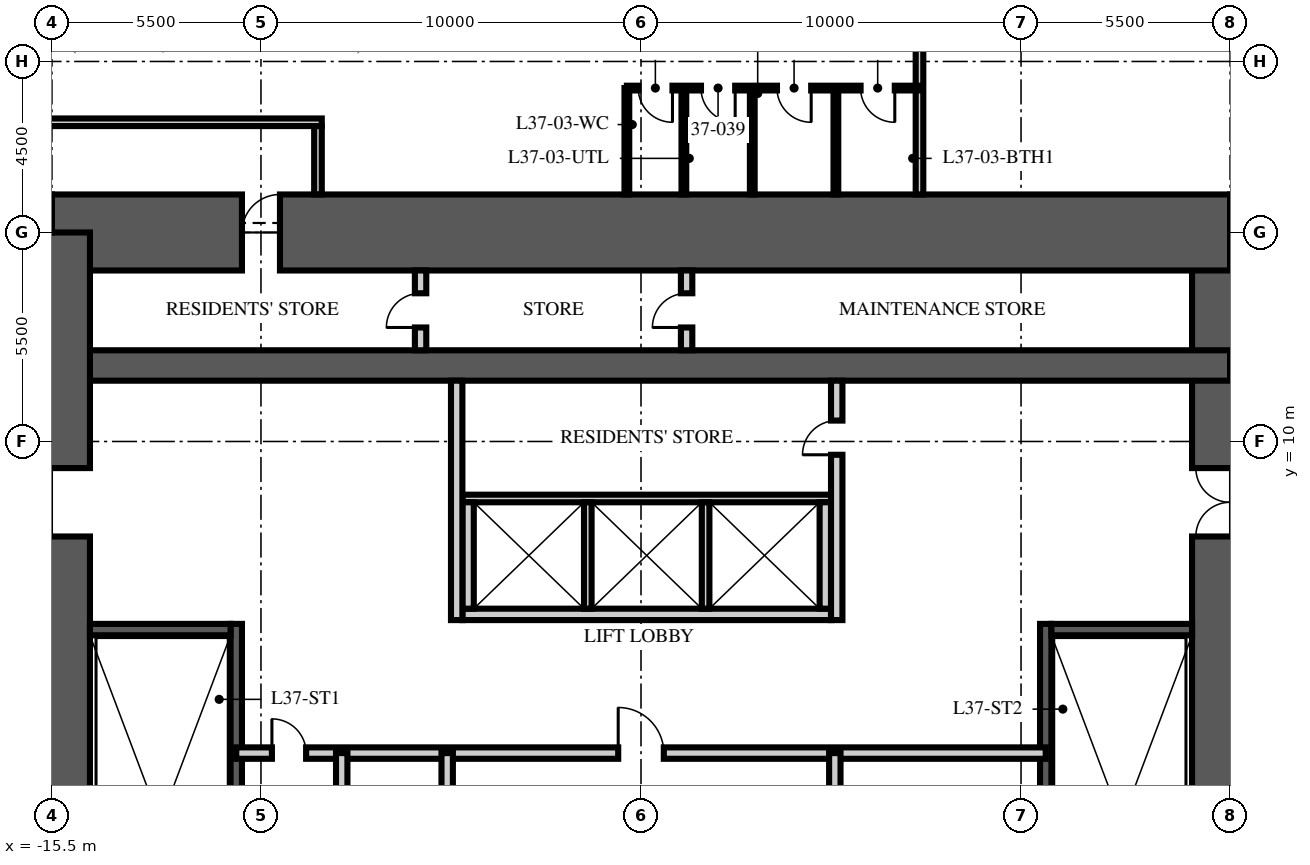
"""IFC4 building model, lengths in metres.
Left out: names, types, materials, properties, quantities, classifications, styles, units other than length and angle.
Written with IfcOpenShell. Run it as: python <this file> out.ifc"""

import sys

from ifc_helpers import new_model, si_unit, direction, frame, frame_2d, origin, place, context, subcontext, project, spatial, rectangle, extrude, element, fill, save


model = new_model("IFC4")
c1 = context("Model", 3, precision=1e-05, world=origin(), true_north=direction((0.0, 1.0)))
c2 = subcontext(c1, "Body", "Model", "MODEL_VIEW")
j1 = project(units=[si_unit("LENGTHUNIT", "METRE"), si_unit("PLANEANGLEUNIT", "RADIAN")], contexts=[c1])
p1 = place(None, origin())
s1 = spatial("IfcSite", under=j1, at=p1, CompositionType="ELEMENT")
p2 = place(p1, origin())
s2 = spatial("IfcBuilding", under=s1, at=p2, CompositionType="ELEMENT")
p3 = place(p2, frame((0.0, 0.0, 148.5)))
s3 = spatial("IfcBuildingStorey", under=s2, at=p3, CompositionType="ELEMENT", Elevation=148.5)
p4 = place(p3, frame((15.5, -15.5, -0.25), z_axis=(0.0, 0.0, 1.0), x_axis=(0.0, 1.0, 0.0)))
e1 = element("IfcWall", 1, at=p4, inside=s3, PredefinedType="SHEAR", context=c2, shape_type="SweptSolid", body=[
    extrude(rectangle(XDim=31.0, YDim=2.0, at=frame_2d((15.5, 0.0))), origin(), (0.0, 0.0, 1.0), 3.75),
])
p5 = place(p4, frame((6.5, 0.0, 0.25)))
e2 = element("IfcOpeningElement", 2, at=p5, cuts=e1, PredefinedType="OPENING", context=c2, shape_type="SweptSolid", body=[
    extrude(rectangle(XDim=1.2, YDim=2.1, at=frame_2d((0.6, 1.05))), frame((0.0, 1.01, 0.0), z_axis=(0.0, -1.0, 0.0), x_axis=(1.0, 0.0, 0.0)), (0.0, 0.0, 1.0), 2.02),
])
p6 = place(p4, frame((23.0, 0.0, 0.25)))
e3 = element("IfcOpeningElement", 3, at=p6, cuts=e1, PredefinedType="OPENING", context=c2, shape_type="SweptSolid", body=[
    extrude(rectangle(XDim=1.8, YDim=2.1, at=frame_2d((0.9, 1.05))), frame((0.0, 1.01, 0.0), z_axis=(0.0, -1.0, 0.0), x_axis=(1.0, 0.0, 0.0)), (0.0, 0.0, 1.0), 2.02),
])
p7 = place(p3, frame((-15.5, 15.5, -0.25), z_axis=(0.0, 0.0, 1.0), x_axis=(1.0, 0.0, 0.0)))
e4 = element("IfcWall", 4, at=p7, inside=s3, PredefinedType="SHEAR", context=c2, shape_type="SweptSolid", body=[
    extrude(rectangle(XDim=31.0, YDim=2.0, at=frame_2d((15.5, 0.0))), origin(), (0.0, 0.0, 1.0), 3.75),
])
p8 = place(p7, frame((5.0, 0.0, 0.25)))
e5 = element("IfcOpeningElement", 5, at=p8, cuts=e4, PredefinedType="OPENING", context=c2, shape_type="SweptSolid", body=[
    extrude(rectangle(XDim=1.0, YDim=2.1, at=frame_2d((0.5, 1.05))), frame((0.0, 1.01, 0.0), z_axis=(0.0, -1.0, 0.0), x_axis=(1.0, 0.0, 0.0)), (0.0, 0.0, 1.0), 2.02),
])
p9 = place(p3, frame((-15.5, 12.0, -0.25), z_axis=(0.0, 0.0, 1.0), x_axis=(1.0, 0.0, 0.0)))
e6 = element("IfcWall", 6, at=p9, inside=s3, PredefinedType="SHEAR", context=c2, shape_type="SweptSolid", body=[
    extrude(rectangle(XDim=31.0, YDim=0.8, at=frame_2d((15.5, 0.0))), origin(), (0.0, 0.0, 1.0), 3.75),
])
p10 = place(p3, frame((-15.5, -15.5, -0.25), z_axis=(0.0, 0.0, 1.0), x_axis=(0.0, 1.0, 0.0)))
e7 = element("IfcWall", 7, at=p10, inside=s3, PredefinedType="SHEAR", context=c2, shape_type="SweptSolid", body=[
    extrude(rectangle(XDim=31.0, YDim=2.0, at=frame_2d((15.5, 0.0))), origin(), (0.0, 0.0, 1.0), 3.75),
])
p11 = place(p10, frame((6.5, 0.0, 0.25)))
e8 = element("IfcOpeningElement", 8, at=p11, cuts=e7, PredefinedType="OPENING", context=c2, shape_type="SweptSolid", body=[
    extrude(rectangle(XDim=1.2, YDim=2.1, at=frame_2d((0.6, 1.05))), frame((0.0, 1.01, 0.0), z_axis=(0.0, -1.0, 0.0), x_axis=(1.0, 0.0, 0.0)), (0.0, 0.0, 1.0), 2.02),
])
p12 = place(p10, frame((23.0, 0.0, 0.25)))
e9 = element("IfcOpeningElement", 9, at=p12, cuts=e7, PredefinedType="OPENING", context=c2, shape_type="SweptSolid", body=[
    extrude(rectangle(XDim=1.8, YDim=2.1, at=frame_2d((0.9, 1.05))), frame((0.0, 1.01, 0.0), z_axis=(0.0, -1.0, 0.0), x_axis=(1.0, 0.0, 0.0)), (0.0, 0.0, 1.0), 2.02),
])
p13 = place(p3, frame((-10.65, -4.9, 0.0), z_axis=(0.0, 0.0, 1.0), x_axis=(0.0, 1.0, 0.0)))
e10 = element("IfcWall", 10, at=p13, inside=s3, PredefinedType="SOLIDWALL", context=c2, shape_type="SweptSolid", body=[
    extrude(rectangle(XDim=10.1, YDim=0.3, at=frame_2d((5.05, 0.0))), origin(), (0.0, 0.0, 1.0), 3.5),
])
p14 = place(p3, frame((-14.5, 5.05, 0.0), z_axis=(0.0, 0.0, 1.0), x_axis=(1.0, 0.0, 0.0)))
e11 = element("IfcWall", 11, at=p14, inside=s3, PredefinedType="SOLIDWALL", context=c2, shape_type="SweptSolid", body=[
    extrude(rectangle(XDim=3.7, YDim=0.3, at=frame_2d((1.85, 0.0))), origin(), (0.0, 0.0, 1.0), 3.5),
])
p15 = place(p3, frame((10.65, -4.9, 0.0), z_axis=(0.0, 0.0, 1.0), x_axis=(0.0, 1.0, 0.0)))
e12 = element("IfcWall", 12, at=p15, inside=s3, PredefinedType="SOLIDWALL", context=c2, shape_type="SweptSolid", body=[
    extrude(rectangle(XDim=10.1, YDim=0.3, at=frame_2d((5.05, 0.0))), origin(), (0.0, 0.0, 1.0), 3.5),
])
p16 = place(p3, frame((14.5, 5.05, 0.0), z_axis=(0.0, 0.0, 1.0), x_axis=(-1.0, 0.0, 0.0)))
e13 = element("IfcWall", 13, at=p16, inside=s3, PredefinedType="SOLIDWALL", context=c2, shape_type="SweptSolid", body=[
    extrude(rectangle(XDim=3.7, YDim=0.3, at=frame_2d((1.85, 0.0))), origin(), (0.0, 0.0, 1.0), 3.5),
])
p17 = place(p3, frame((-4.7, 5.45, 0.0), z_axis=(0.0, 0.0, 1.0), x_axis=(1.0, 0.0, 0.0)))
e14 = element("IfcWall", 14, at=p17, inside=s3, PredefinedType="PARTITIONING", context=c2, shape_type="SweptSolid", body=[
    extrude(rectangle(XDim=9.7, YDim=0.3, at=frame_2d((4.85, 0.0))), origin(), (0.0, 0.0, 1.0), 3.5),
])
p18 = place(p3, frame((-4.7, 8.5, 0.0), z_axis=(0.0, 0.0, 1.0), x_axis=(1.0, 0.0, 0.0)))
e15 = element("IfcWall", 15, at=p18, inside=s3, PredefinedType="PARTITIONING", context=c2, shape_type="SweptSolid", body=[
    extrude(rectangle(XDim=9.7, YDim=0.2, at=frame_2d((4.85, 0.0))), origin(), (0.0, 0.0, 1.0), 3.5),
])
for number, where, z_axis, x_axis in (
    (16, (-4.55, 5.6, 0.0), (0.0, 0.0, 1.0), (0.0, 1.0, 0.0)),
    (17, (4.85, 5.6, 0.0), (0.0, 0.0, 1.0), (0.0, 1.0, 0.0)),
):
    element("IfcWall", number, at=place(p3, frame(where, z_axis=z_axis, x_axis=x_axis)), inside=s3, PredefinedType="PARTITIONING", context=c2, shape_type="SweptSolid", body=[
        extrude(rectangle(XDim=2.8, YDim=0.3, at=frame_2d((1.4, 0.0))), origin(), (0.0, 0.0, 1.0), 3.5),
    ])
for number, where, z_axis, x_axis in (
    (18, (-1.4, 5.6, 0.0), (0.0, 0.0, 1.0), (0.0, 1.0, 0.0)),
    (19, (1.7, 5.6, 0.0), (0.0, 0.0, 1.0), (0.0, 1.0, 0.0)),
):
    element("IfcWall", number, at=place(p3, frame(where, z_axis=z_axis, x_axis=x_axis)), inside=s3, PredefinedType="PARTITIONING", context=c2, shape_type="SweptSolid", body=[
        extrude(rectangle(XDim=2.8, YDim=0.2, at=frame_2d((1.4, 0.0))), origin(), (0.0, 0.0, 1.0), 3.5),
    ])
p19 = place(p3, frame((-10.65, 1.8, 0.0), z_axis=(0.0, 0.0, 1.0), x_axis=(1.0, 0.0, 0.0)))
e20 = element("IfcWall", 20, at=p19, inside=s3, PredefinedType="PARTITIONING", context=c2, shape_type="SweptSolid", body=[
    extrude(rectangle(XDim=21.3, YDim=0.3, at=frame_2d((10.65, 0.0))), origin(), (0.0, 0.0, 1.0), 3.5),
])
p20 = place(p19, frame((10.05, 0.0, 0.0)))
e21 = element("IfcOpeningElement", 21, at=p20, cuts=e20, PredefinedType="OPENING", context=c2, shape_type="SweptSolid", body=[
    extrude(rectangle(XDim=1.2, YDim=2.1, at=frame_2d((0.6, 1.05))), frame((0.0, 0.16, 0.0), z_axis=(0.0, -1.0, 0.0), x_axis=(1.0, 0.0, 0.0)), (0.0, 0.0, 1.0), 0.32),
])
p21 = place(p19, frame((0.938, 0.0, 0.0)))
e22 = element("IfcOpeningElement", 22, at=p21, cuts=e20, PredefinedType="OPENING", context=c2, shape_type="SweptSolid", body=[
    extrude(rectangle(XDim=0.9, YDim=2.1, at=frame_2d((0.45, 1.05))), frame((0.0, 0.16, 0.0), z_axis=(0.0, -1.0, 0.0), x_axis=(1.0, 0.0, 0.0)), (0.0, 0.0, 1.0), 0.32),
])
p22 = place(p3, frame((-5.1, -6.65, 0.0), z_axis=(0.0, 0.0, 1.0), x_axis=(0.0, 1.0, 0.0)))
e23 = element("IfcWall", 23, at=p22, inside=s3, PredefinedType="PARTITIONING", context=c2, shape_type="SweptSolid", body=[
    extrude(rectangle(XDim=8.45, YDim=0.3, at=frame_2d((4.225, 0.0))), origin(), (0.0, 0.0, 1.0), 3.5),
])
p23 = place(p22, frame((1.7, 0.0, 0.0)))
e24 = element("IfcOpeningElement", 24, at=p23, cuts=e23, PredefinedType="OPENING", context=c2, shape_type="SweptSolid", body=[
    extrude(rectangle(XDim=0.9, YDim=2.1, at=frame_2d((0.45, 1.05))), frame((0.0, 0.16, 0.0), z_axis=(0.0, -1.0, 0.0), x_axis=(1.0, 0.0, 0.0)), (0.0, 0.0, 1.0), 0.32),
])
p24 = place(p22, frame((5.925, 0.0, 0.0)))
e25 = element("IfcOpeningElement", 25, at=p24, cuts=e23, PredefinedType="OPENING", context=c2, shape_type="SweptSolid", body=[
    extrude(rectangle(XDim=0.9, YDim=2.1, at=frame_2d((0.45, 1.05))), frame((0.0, 0.16, 0.0), z_axis=(0.0, -1.0, 0.0), x_axis=(1.0, 0.0, 0.0)), (0.0, 0.0, 1.0), 0.32),
])
p25 = place(p3, frame((5.1, -6.65, 0.0), z_axis=(0.0, 0.0, 1.0), x_axis=(0.0, 1.0, 0.0)))
e26 = element("IfcWall", 26, at=p25, inside=s3, PredefinedType="PARTITIONING", context=c2, shape_type="SweptSolid", body=[
    extrude(rectangle(XDim=8.45, YDim=0.3, at=frame_2d((4.225, 0.0))), origin(), (0.0, 0.0, 1.0), 3.5),
])
p26 = place(p25, frame((1.866, 0.0, 0.0)))
e27 = element("IfcOpeningElement", 27, at=p26, cuts=e26, PredefinedType="OPENING", context=c2, shape_type="SweptSolid", body=[
    extrude(rectangle(XDim=0.9, YDim=2.1, at=frame_2d((0.45, 1.05))), frame((0.0, 0.16, 0.0), z_axis=(0.0, -1.0, 0.0), x_axis=(1.0, 0.0, 0.0)), (0.0, 0.0, 1.0), 0.32),
])
p27 = place(p25, frame((6.091, 0.0, 0.0)))
e28 = element("IfcOpeningElement", 28, at=p27, cuts=e26, PredefinedType="OPENING", context=c2, shape_type="SweptSolid", body=[
    extrude(rectangle(XDim=0.9, YDim=2.1, at=frame_2d((0.45, 1.05))), frame((0.0, 0.16, 0.0), z_axis=(0.0, -1.0, 0.0), x_axis=(1.0, 0.0, 0.0)), (0.0, 0.0, 1.0), 0.32),
])
p28 = place(p3, frame((-7.875, -2.35, 0.0), z_axis=(0.0, 0.0, 1.0), x_axis=(0.0, 1.0, 0.0)))
e29 = element("IfcWall", 29, at=p28, inside=s3, PredefinedType="PARTITIONING", context=c2, shape_type="SweptSolid", body=[
    extrude(rectangle(XDim=4.15, YDim=0.3, at=frame_2d((2.075, 0.0))), origin(), (0.0, 0.0, 1.0), 3.5),
])
p29 = place(p3, frame((-4.85, 5.3, 0.0), z_axis=(0.0, 0.0, 1.0), x_axis=(0.0, 1.0, 0.0)))
e30 = element("IfcWall", 30, at=p29, inside=s3, PredefinedType="PARTITIONING", context=c2, shape_type="SweptSolid", body=[
    extrude(rectangle(XDim=6.3, YDim=0.3, at=frame_2d((3.15, 0.0))), origin(), (0.0, 0.0, 1.0), 3.5),
])
p30 = place(p3, frame((5.15, 5.3, 0.0), z_axis=(0.0, 0.0, 1.0), x_axis=(0.0, 1.0, 0.0)))
e31 = element("IfcWall", 31, at=p30, inside=s3, PredefinedType="PARTITIONING", context=c2, shape_type="SweptSolid", body=[
    extrude(rectangle(XDim=6.3, YDim=0.3, at=frame_2d((3.15, 0.0))), origin(), (0.0, 0.0, 1.0), 3.5),
])
p31 = place(p30, frame((4.35, 0.0, 0.0)))
e32 = element("IfcOpeningElement", 32, at=p31, cuts=e31, PredefinedType="OPENING", context=c2, shape_type="SweptSolid", body=[
    extrude(rectangle(XDim=0.9, YDim=2.1, at=frame_2d((0.45, 1.05))), frame((0.0, 0.16, 0.0), z_axis=(0.0, -1.0, 0.0), x_axis=(1.0, 0.0, 0.0)), (0.0, 0.0, 1.0), 0.32),
])
p32 = place(p3, frame((-5.8, 12.4, 0.0), z_axis=(0.0, 0.0, 1.0), x_axis=(0.0, 1.0, 0.0)))
e33 = element("IfcWall", 33, at=p32, inside=s3, PredefinedType="PARTITIONING", context=c2, shape_type="SweptSolid", body=[
    extrude(rectangle(XDim=2.1, YDim=0.3, at=frame_2d((1.05, 0.0))), origin(), (0.0, 0.0, 1.0), 3.5),
])
p33 = place(p32, frame((0.6, 0.0, 0.0)))
e34 = element("IfcOpeningElement", 34, at=p33, cuts=e33, PredefinedType="OPENING", context=c2, shape_type="SweptSolid", body=[
    extrude(rectangle(XDim=0.9, YDim=2.1, at=frame_2d((0.45, 1.05))), frame((0.0, 0.16, 0.0), z_axis=(0.0, -1.0, 0.0), x_axis=(1.0, 0.0, 0.0)), (0.0, 0.0, 1.0), 0.32),
])
p34 = place(p3, frame((1.2, 12.4, 0.0), z_axis=(0.0, 0.0, 1.0), x_axis=(0.0, 1.0, 0.0)))
e35 = element("IfcWall", 35, at=p34, inside=s3, PredefinedType="PARTITIONING", context=c2, shape_type="SweptSolid", body=[
    extrude(rectangle(XDim=2.1, YDim=0.3, at=frame_2d((1.05, 0.0))), origin(), (0.0, 0.0, 1.0), 3.5),
])
p35 = place(p34, frame((0.6, 0.0, 0.0)))
e36 = element("IfcOpeningElement", 36, at=p35, cuts=e35, PredefinedType="OPENING", context=c2, shape_type="SweptSolid", body=[
    extrude(rectangle(XDim=0.9, YDim=2.1, at=frame_2d((0.45, 1.05))), frame((0.0, 0.16, 0.0), z_axis=(0.0, -1.0, 0.0), x_axis=(1.0, 0.0, 0.0)), (0.0, 0.0, 1.0), 0.32),
])
p36 = place(p3, frame((-18.5, 18.4, 0.0), z_axis=(0.0, 0.0, 1.0), x_axis=(1.0, 0.0, 0.0)))
e37 = element("IfcWall", 37, at=p36, inside=s3, PredefinedType="PARTITIONING", context=c2, shape_type="SweptSolid", body=[
    extrude(rectangle(XDim=10.1, YDim=0.2, at=frame_2d((5.05, 0.0))), origin(), (0.0, 0.0, 1.0), 2.3),
])
p37 = place(p3, frame((-8.5, 18.3, 0.0), z_axis=(0.0, 0.0, 1.0), x_axis=(0.0, -1.0, 0.0)))
e38 = element("IfcWall", 38, at=p37, inside=s3, PredefinedType="PARTITIONING", context=c2, shape_type="SweptSolid", body=[
    extrude(rectangle(XDim=1.8, YDim=0.2, at=frame_2d((0.9, 0.0))), origin(), (0.0, 0.0, 1.0), 3.5),
])
p38 = place(p3, frame((7.328, 16.5, 0.0), z_axis=(0.0, 0.0, 1.0), x_axis=(0.0, 1.0, 0.0)))
e39 = element("IfcWall", 39, at=p38, inside=s3, PredefinedType="PARTITIONING", context=c2, shape_type="SweptSolid", body=[
    extrude(rectangle(XDim=12.15, YDim=0.2, at=frame_2d((6.075, 0.0))), origin(), (0.0, 0.0, 1.0), 2.81),
])
p39 = place(p3, frame((7.328, 19.3, 0.0), z_axis=(0.0, 0.0, 1.0), x_axis=(-1.0, 0.0, 0.0)))
e40 = element("IfcWall", 40, at=p39, inside=s3, PredefinedType="PARTITIONING", context=c2, shape_type="SweptSolid", body=[
    extrude(rectangle(XDim=7.7, YDim=0.125, at=frame_2d((3.85, 0.0))), origin(), (0.0, 0.0, 1.0), 2.7),
])
p40 = place(p39, frame((0.65, 0.0, 0.0)))
e41 = element("IfcOpeningElement", 41, at=p40, cuts=e40, PredefinedType="OPENING", context=c2, shape_type="SweptSolid", body=[
    extrude(rectangle(XDim=0.9, YDim=2.1, at=frame_2d((0.45, 1.05))), frame((0.0, 0.073, 0.0), z_axis=(0.0, -1.0, 0.0), x_axis=(1.0, 0.0, 0.0)), (0.0, 0.0, 1.0), 0.145),
])
p41 = place(p39, frame((2.85, 0.0, 0.0)))
e42 = element("IfcOpeningElement", 42, at=p41, cuts=e40, PredefinedType="OPENING", context=c2, shape_type="SweptSolid", body=[
    extrude(rectangle(XDim=0.9, YDim=2.1, at=frame_2d((0.45, 1.05))), frame((0.0, 0.073, 0.0), z_axis=(0.0, -1.0, 0.0), x_axis=(1.0, 0.0, 0.0)), (0.0, 0.0, 1.0), 0.145),
])
p42 = place(p39, frame((4.85, 0.0, 0.0)))
e43 = element("IfcOpeningElement", 43, at=p42, cuts=e40, PredefinedType="OPENING", context=c2, shape_type="SweptSolid", body=[
    extrude(rectangle(XDim=0.9, YDim=2.1, at=frame_2d((0.45, 1.05))), frame((0.0, 0.073, 0.0), z_axis=(0.0, -1.0, 0.0), x_axis=(1.0, 0.0, 0.0)), (0.0, 0.0, 1.0), 0.145),
])
p43 = place(p39, frame((6.5, 0.0, 0.0)))
e44 = element("IfcOpeningElement", 44, at=p43, cuts=e40, PredefinedType="OPENING", context=c2, shape_type="SweptSolid", body=[
    extrude(rectangle(XDim=0.9, YDim=2.1, at=frame_2d((0.45, 1.05))), frame((0.0, 0.073, 0.0), z_axis=(0.0, -1.0, 0.0), x_axis=(1.0, 0.0, 0.0)), (0.0, 0.0, 1.0), 0.145),
])
for number, where, z_axis, x_axis in (
    (45, (5.128, 16.5, 0.0), (0.0, 0.0, 1.0), (0.0, 1.0, 0.0)),
    (46, (2.928, 16.5, 0.0), (0.0, 0.0, 1.0), (0.0, 1.0, 0.0)),
    (47, (1.128, 16.5, 0.0), (0.0, 0.0, 1.0), (0.0, 1.0, 0.0)),
    (48, (-0.372, 16.5, 0.0), (0.0, 0.0, 1.0), (0.0, 1.0, 0.0)),
):
    element("IfcWall", number, at=place(p3, frame(where, z_axis=z_axis, x_axis=x_axis)), inside=s3, PredefinedType="PARTITIONING", context=c2, shape_type="SweptSolid", body=[
        extrude(rectangle(XDim=2.8, YDim=0.125, at=frame_2d((1.4, 0.0))), origin(), (0.0, 0.0, 1.0), 3.5),
    ])
p44 = place(p12, origin())
e49 = element("IfcDoor", 49, at=p44, inside=s3, OperationType="DOUBLE_DOOR_SINGLE_SWING", PredefinedType="DOOR", context=c2, shape_type="SweptSolid", body=[
    extrude(rectangle(XDim=1.8, YDim=2.1, at=frame_2d((0.9, 1.05))), frame((0.0, 0.025, 0.0), z_axis=(0.0, -1.0, 0.0), x_axis=(1.0, 0.0, 0.0)), (0.0, 0.0, 1.0), 0.05),
])
fill(e9, e49)
p45 = place(p6, origin())
e50 = element("IfcDoor", 50, at=p45, inside=s3, OperationType="DOUBLE_DOOR_SINGLE_SWING", PredefinedType="DOOR", context=c2, shape_type="SweptSolid", body=[
    extrude(rectangle(XDim=1.8, YDim=2.1, at=frame_2d((0.9, 1.05))), frame((0.0, 0.025, 0.0), z_axis=(0.0, -1.0, 0.0), x_axis=(1.0, 0.0, 0.0)), (0.0, 0.0, 1.0), 0.05),
])
fill(e3, e50)
p46 = place(p20, origin())
e51 = element("IfcDoor", 51, at=p46, inside=s3, OperationType="SINGLE_SWING_LEFT", PredefinedType="DOOR", context=c2, shape_type="SweptSolid", body=[
    extrude(rectangle(XDim=1.2, YDim=2.1, at=frame_2d((0.6, 1.05))), frame((0.0, 0.025, 0.0), z_axis=(0.0, -1.0, 0.0), x_axis=(1.0, 0.0, 0.0)), (0.0, 0.0, 1.0), 0.05),
])
fill(e21, e51)
p47 = place(p21, origin())
e52 = element("IfcDoor", 52, at=p47, inside=s3, OperationType="SINGLE_SWING_LEFT", PredefinedType="DOOR", context=c2, shape_type="SweptSolid", body=[
    extrude(rectangle(XDim=0.9, YDim=2.1, at=frame_2d((0.45, 1.05))), frame((0.0, 0.025, 0.0), z_axis=(0.0, -1.0, 0.0), x_axis=(1.0, 0.0, 0.0)), (0.0, 0.0, 1.0), 0.05),
])
fill(e22, e52)
p48 = place(p31, origin())
e53 = element("IfcDoor", 53, at=p48, inside=s3, OperationType="SINGLE_SWING_LEFT", PredefinedType="DOOR", context=c2, shape_type="SweptSolid", body=[
    extrude(rectangle(XDim=0.9, YDim=2.1, at=frame_2d((0.45, 1.05))), frame((0.0, 0.025, 0.0), z_axis=(0.0, -1.0, 0.0), x_axis=(1.0, 0.0, 0.0)), (0.0, 0.0, 1.0), 0.05),
])
fill(e32, e53)
p49 = place(p33, origin())
e54 = element("IfcDoor", 54, at=p49, inside=s3, OperationType="SINGLE_SWING_LEFT", PredefinedType="DOOR", context=c2, shape_type="SweptSolid", body=[
    extrude(rectangle(XDim=0.9, YDim=2.1, at=frame_2d((0.45, 1.05))), frame((0.0, 0.025, 0.0), z_axis=(0.0, -1.0, 0.0), x_axis=(1.0, 0.0, 0.0)), (0.0, 0.0, 1.0), 0.05),
])
fill(e34, e54)
p50 = place(p35, origin())
e55 = element("IfcDoor", 55, at=p50, inside=s3, OperationType="SINGLE_SWING_LEFT", PredefinedType="DOOR", context=c2, shape_type="SweptSolid", body=[
    extrude(rectangle(XDim=0.9, YDim=2.1, at=frame_2d((0.45, 1.05))), frame((0.0, 0.025, 0.0), z_axis=(0.0, -1.0, 0.0), x_axis=(1.0, 0.0, 0.0)), (0.0, 0.0, 1.0), 0.05),
])
fill(e36, e55)
p51 = place(p8, origin())
e56 = element("IfcDoor", 56, at=p51, inside=s3, OperationType="SINGLE_SWING_RIGHT", PredefinedType="DOOR", context=c2, shape_type="SweptSolid", body=[
    extrude(rectangle(XDim=1.0, YDim=2.1, at=frame_2d((0.5, 1.05))), frame((0.0, 0.025, 0.0), z_axis=(0.0, -1.0, 0.0), x_axis=(1.0, 0.0, 0.0)), (0.0, 0.0, 1.0), 0.05),
])
fill(e5, e56)
p52 = place(p40, origin())
e57 = element("IfcDoor", 57, at=p52, inside=s3, OperationType="SINGLE_SWING_LEFT", PredefinedType="DOOR", context=c2, shape_type="SweptSolid", body=[
    extrude(rectangle(XDim=0.9, YDim=2.1, at=frame_2d((0.45, 1.05))), frame((0.0, 0.025, 0.0), z_axis=(0.0, -1.0, 0.0), x_axis=(1.0, 0.0, 0.0)), (0.0, 0.0, 1.0), 0.05),
])
fill(e41, e57)
p53 = place(p41, origin())
e58 = element("IfcDoor", 58, at=p53, inside=s3, OperationType="SINGLE_SWING_LEFT", PredefinedType="DOOR", context=c2, shape_type="SweptSolid", body=[
    extrude(rectangle(XDim=0.9, YDim=2.1, at=frame_2d((0.45, 1.05))), frame((0.0, 0.025, 0.0), z_axis=(0.0, -1.0, 0.0), x_axis=(1.0, 0.0, 0.0)), (0.0, 0.0, 1.0), 0.05),
])
fill(e42, e58)
p54 = place(p42, origin())
e59 = element("IfcDoor", 59, at=p54, inside=s3, OperationType="SINGLE_SWING_LEFT", PredefinedType="DOOR", context=c2, shape_type="SweptSolid", body=[
    extrude(rectangle(XDim=0.9, YDim=2.1, at=frame_2d((0.45, 1.05))), frame((0.0, 0.025, 0.0), z_axis=(0.0, -1.0, 0.0), x_axis=(1.0, 0.0, 0.0)), (0.0, 0.0, 1.0), 0.05),
])
fill(e43, e59)
p55 = place(p43, origin())
e60 = element("IfcDoor", 60, at=p55, inside=s3, OperationType="SINGLE_SWING_LEFT", PredefinedType="DOOR", context=c2, shape_type="SweptSolid", body=[
    extrude(rectangle(XDim=0.9, YDim=2.1, at=frame_2d((0.45, 1.05))), frame((0.0, 0.025, 0.0), z_axis=(0.0, -1.0, 0.0), x_axis=(1.0, 0.0, 0.0)), (0.0, 0.0, 1.0), 0.05),
])
fill(e44, e60)
save(model, sys.argv[1])
